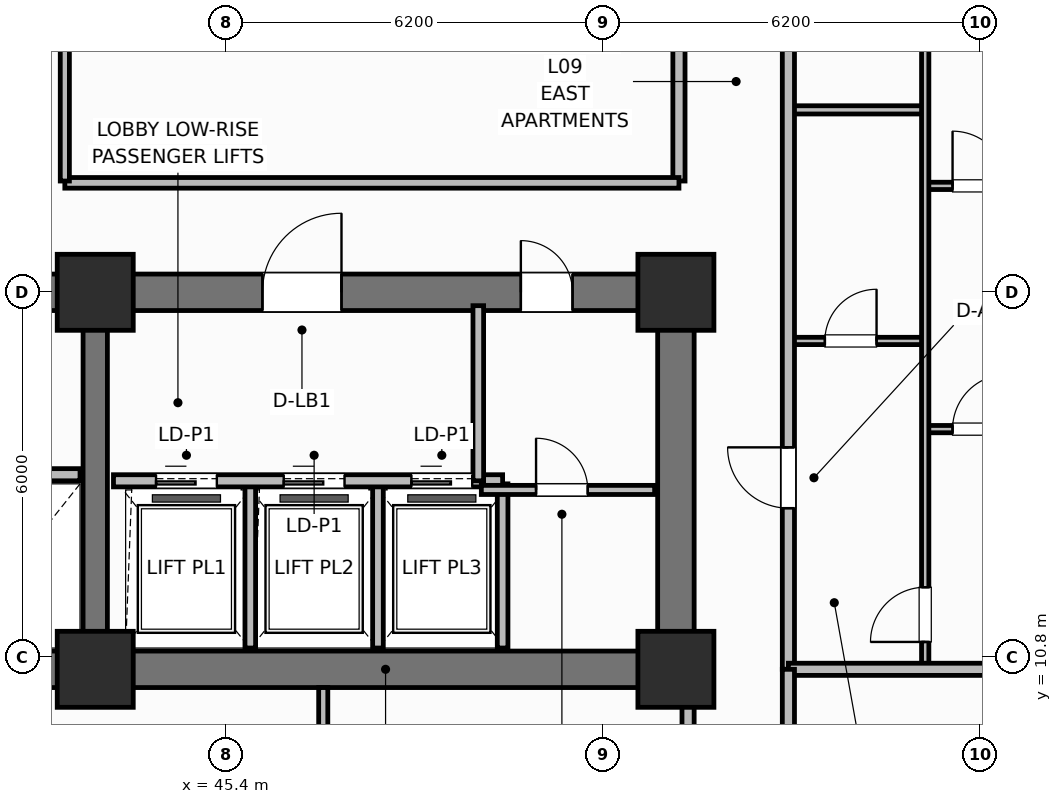
"""IFC4 building model, lengths in metres.
Left out: names, types, materials, properties, quantities, classifications, styles, units other than length and angle.
Written with IfcOpenShell. Run it as: python <this file> out.ifc"""

import sys

from ifc_helpers import new_model, si_unit, direction, frame, frame_2d, origin, origin_2d, place, context, subcontext, project, spatial, rectangle, extrude, element, fill, save


model = new_model("IFC4")
c1 = context("Model", 3, precision=1e-05, world=origin(), true_north=direction((0.0, 1.0)))
c2 = subcontext(c1, "Body", "Model", "MODEL_VIEW")
j1 = project(units=[si_unit("LENGTHUNIT", "METRE"), si_unit("PLANEANGLEUNIT", "RADIAN")], contexts=[c1])
p1 = place(None, origin())
s1 = spatial("IfcSite", under=j1, at=p1, CompositionType="ELEMENT")
p2 = place(p1, origin())
s2 = spatial("IfcBuilding", under=s1, at=p2, CompositionType="ELEMENT")
p3 = place(p2, frame((0.0, 0.0, 39.9)))
s3 = spatial("IfcBuildingStorey", under=s2, at=p3, CompositionType="ELEMENT", Elevation=39.9)
p4 = place(p3, frame((52.8, 10.6, 0.0), z_axis=(0.0, 0.0, 1.0), x_axis=(-1.0, 0.0, 0.0)))
e1 = element("IfcWall", 1, at=p4, inside=s3, PredefinedType="SHEAR", context=c2, shape_type="SweptSolid", body=[
    extrude(rectangle(XDim=27.2, YDim=0.6, at=frame_2d((13.6, 0.0))), origin(), (0.0, 0.0, 1.0), 3.7),
])
p5 = place(p3, frame((52.8, 10.9, 0.0), z_axis=(0.0, 0.0, 1.0), x_axis=(0.0, 1.0, 0.0)))
e2 = element("IfcWall", 2, at=p5, inside=s3, PredefinedType="SHEAR", context=c2, shape_type="SweptSolid", body=[
    extrude(rectangle(XDim=5.6, YDim=0.6, at=frame_2d((2.8, 0.0))), origin(), (0.0, 0.0, 1.0), 3.7),
])
p6 = place(p3, frame((25.6, 16.8, 0.0), z_axis=(0.0, 0.0, 1.0), x_axis=(1.0, 0.0, 0.0)))
e3 = element("IfcWall", 3, at=p6, inside=s3, PredefinedType="SHEAR", context=c2, shape_type="SweptSolid", body=[
    extrude(rectangle(XDim=27.2, YDim=0.6, at=frame_2d((13.6, 0.0))), origin(), (0.0, 0.0, 1.0), 3.7),
])
p7 = place(p6, frame((1.7, 0.0, 0.0)))
e4 = element("IfcOpeningElement", 4, at=p7, cuts=e3, PredefinedType="OPENING", context=c2, shape_type="SweptSolid", body=[
    extrude(rectangle(XDim=1.1, YDim=2.15, at=frame_2d((0.55, 1.075))), frame((0.0, 0.31, 0.0), z_axis=(0.0, -1.0, 0.0), x_axis=(1.0, 0.0, 0.0)), (0.0, 0.0, 1.0), 0.62),
])
p8 = place(p6, frame((4.45, 0.0, 0.0)))
e5 = element("IfcOpeningElement", 5, at=p8, cuts=e3, PredefinedType="OPENING", context=c2, shape_type="SweptSolid", body=[
    extrude(rectangle(XDim=0.85, YDim=2.1, at=frame_2d((0.425, 1.05))), frame((0.0, 0.31, 0.0), z_axis=(0.0, -1.0, 0.0), x_axis=(1.0, 0.0, 0.0)), (0.0, 0.0, 1.0), 0.62),
])
p9 = place(p6, frame((6.5, 0.0, 0.0)))
e6 = element("IfcOpeningElement", 6, at=p9, cuts=e3, PredefinedType="OPENING", context=c2, shape_type="SweptSolid", body=[
    extrude(rectangle(XDim=0.85, YDim=2.1, at=frame_2d((0.425, 1.05))), frame((0.0, 0.31, 0.0), z_axis=(0.0, -1.0, 0.0), x_axis=(1.0, 0.0, 0.0)), (0.0, 0.0, 1.0), 0.62),
])
p10 = place(p6, frame((13.0, 0.0, 0.0)))
e7 = element("IfcOpeningElement", 7, at=p10, cuts=e3, PredefinedType="OPENING", context=c2, shape_type="SweptSolid", body=[
    extrude(rectangle(XDim=1.2, YDim=2.15, at=frame_2d((0.6, 1.075))), frame((0.0, 0.31, 0.0), z_axis=(0.0, -1.0, 0.0), x_axis=(1.0, 0.0, 0.0)), (0.0, 0.0, 1.0), 0.62),
])
p11 = place(p6, frame((20.4, 0.0, 0.0)))
e8 = element("IfcOpeningElement", 8, at=p11, cuts=e3, PredefinedType="OPENING", context=c2, shape_type="SweptSolid", body=[
    extrude(rectangle(XDim=1.3, YDim=2.2, at=frame_2d((0.65, 1.1))), frame((0.0, 0.31, 0.0), z_axis=(0.0, -1.0, 0.0), x_axis=(1.0, 0.0, 0.0)), (0.0, 0.0, 1.0), 0.62),
])
p12 = place(p6, frame((24.65, 0.0, 0.0)))
e9 = element("IfcOpeningElement", 9, at=p12, cuts=e3, PredefinedType="OPENING", context=c2, shape_type="SweptSolid", body=[
    extrude(rectangle(XDim=0.85, YDim=2.1, at=frame_2d((0.425, 1.05))), frame((0.0, 0.31, 0.0), z_axis=(0.0, -1.0, 0.0), x_axis=(1.0, 0.0, 0.0)), (0.0, 0.0, 1.0), 0.62),
])
p13 = place(p3, frame((43.25, 10.9, 0.0), z_axis=(0.0, 0.0, 1.0), x_axis=(0.0, 1.0, 0.0)))
e10 = element("IfcWall", 10, at=p13, inside=s3, PredefinedType="SHEAR", context=c2, shape_type="SweptSolid", body=[
    extrude(rectangle(XDim=5.6, YDim=0.4, at=frame_2d((2.8, 0.0))), origin(), (0.0, 0.0, 1.0), 3.7),
])
for number, where, z_axis, x_axis in (
    (11, (43.25, 10.6, 0.0), (0.0, 0.0, 1.0), (1.0, 0.0, 0.0)),
    (12, (43.25, 16.8, 0.0), (0.0, 0.0, 1.0), (1.0, 0.0, 0.0)),
    (13, (52.8, 10.6, 0.0), (0.0, 0.0, 1.0), (1.0, 0.0, 0.0)),
    (14, (52.8, 16.8, 0.0), (0.0, 0.0, 1.0), (1.0, 0.0, 0.0)),
):
    element("IfcColumn", number, at=place(p3, frame(where, z_axis=z_axis, x_axis=x_axis)), inside=s3, PredefinedType="COLUMN", context=c2, shape_type="SweptSolid", body=[
        extrude(rectangle(XDim=1.25, YDim=1.25, at=origin_2d()), origin(), (0.0, 0.0, 1.0), 3.7),
    ])
p14 = place(p3, frame((35.4, 13.8, 0.0), z_axis=(0.0, 0.0, 1.0), x_axis=(1.0, 0.0, 0.0)))
e15 = element("IfcWall", 15, at=p14, inside=s3, PredefinedType="PARTITIONING", context=c2, shape_type="SweptSolid", body=[
    extrude(rectangle(XDim=7.6, YDim=0.2, at=frame_2d((3.8, 0.0))), origin(), (0.0, 0.0, 1.0), 2.3),
])
p15 = place(p14, frame((0.7, 0.0, 0.0)))
e16 = element("IfcOpeningElement", 16, at=p15, cuts=e15, PredefinedType="OPENING", context=c2, shape_type="SweptSolid", body=[
    extrude(rectangle(XDim=1.1, YDim=2.15, at=frame_2d((0.55, 1.075))), frame((0.0, 0.11, 0.0), z_axis=(0.0, -1.0, 0.0), x_axis=(1.0, 0.0, 0.0)), (0.0, 0.0, 1.0), 0.22),
])
p16 = place(p14, frame((3.35, 0.0, 0.0)))
e17 = element("IfcOpeningElement", 17, at=p16, cuts=e15, PredefinedType="OPENING", context=c2, shape_type="SweptSolid", body=[
    extrude(rectangle(XDim=1.2, YDim=2.15, at=frame_2d((0.6, 1.075))), frame((0.0, 0.11, 0.0), z_axis=(0.0, -1.0, 0.0), x_axis=(1.0, 0.0, 0.0)), (0.0, 0.0, 1.0), 0.22),
])
for number, where, z_axis, x_axis in (
    (18, (45.8, 10.95, 0.0), (0.0, 0.0, 1.0), (0.0, 1.0, 0.0)),
    (19, (47.9, 10.95, 0.0), (0.0, 0.0, 1.0), (0.0, 1.0, 0.0)),
    (20, (49.95, 10.95, 0.0), (0.0, 0.0, 1.0), (0.0, 1.0, 0.0)),
):
    element("IfcWall", number, at=place(p3, frame(where, z_axis=z_axis, x_axis=x_axis)), inside=s3, PredefinedType="PARTITIONING", context=c2, shape_type="SweptSolid", body=[
        extrude(rectangle(XDim=2.7, YDim=0.175, at=frame_2d((1.35, 0.0))), origin(), (0.0, 0.0, 1.0), 2.53),
    ])
p17 = place(p3, frame((43.55, 13.7, 0.0), z_axis=(0.0, 0.0, 1.0), x_axis=(1.0, 0.0, 0.0)))
e21 = element("IfcWall", 21, at=p17, inside=s3, PredefinedType="PARTITIONING", context=c2, shape_type="SweptSolid", body=[
    extrude(rectangle(XDim=6.4, YDim=0.2, at=frame_2d((3.2, 0.0))), origin(), (0.0, 0.0, 1.0), 2.53),
])
p18 = place(p17, frame((0.7, 0.0, 0.0)))
e22 = element("IfcOpeningElement", 22, at=p18, cuts=e21, PredefinedType="OPENING", context=c2, shape_type="SweptSolid", body=[
    extrude(rectangle(XDim=1.0, YDim=2.15, at=frame_2d((0.5, 1.075))), frame((0.0, 0.11, 0.0), z_axis=(0.0, -1.0, 0.0), x_axis=(1.0, 0.0, 0.0)), (0.0, 0.0, 1.0), 0.22),
])
p19 = place(p17, frame((2.8, 0.0, 0.0)))
e23 = element("IfcOpeningElement", 23, at=p19, cuts=e21, PredefinedType="OPENING", context=c2, shape_type="SweptSolid", body=[
    extrude(rectangle(XDim=1.0, YDim=2.15, at=frame_2d((0.5, 1.075))), frame((0.0, 0.11, 0.0), z_axis=(0.0, -1.0, 0.0), x_axis=(1.0, 0.0, 0.0)), (0.0, 0.0, 1.0), 0.22),
])
p20 = place(p17, frame((4.9, 0.0, 0.0)))
e24 = element("IfcOpeningElement", 24, at=p20, cuts=e21, PredefinedType="OPENING", context=c2, shape_type="SweptSolid", body=[
    extrude(rectangle(XDim=1.0, YDim=2.15, at=frame_2d((0.5, 1.075))), frame((0.0, 0.11, 0.0), z_axis=(0.0, -1.0, 0.0), x_axis=(1.0, 0.0, 0.0)), (0.0, 0.0, 1.0), 0.22),
])
p21 = place(p3, frame((49.55, 13.7, 0.0), z_axis=(0.0, 0.0, 1.0), x_axis=(0.0, 1.0, 0.0)))
e25 = element("IfcWall", 25, at=p21, inside=s3, PredefinedType="PARTITIONING", context=c2, shape_type="SweptSolid", body=[
    extrude(rectangle(XDim=2.88, YDim=0.175, at=frame_2d((1.44, 0.0))), origin(), (0.0, 0.0, 1.0), 2.53),
])
p22 = place(p3, frame((49.6, 13.55, 0.0), z_axis=(0.0, 0.0, 1.0), x_axis=(1.0, 0.0, 0.0)))
e26 = element("IfcWall", 26, at=p22, inside=s3, PredefinedType="PARTITIONING", context=c2, shape_type="SweptSolid", body=[
    extrude(rectangle(XDim=2.85, YDim=0.15, at=frame_2d((1.425, 0.0))), origin(), (0.0, 0.0, 1.0), 2.53),
])
p23 = place(p22, frame((0.9, 0.0, 0.0)))
e27 = element("IfcOpeningElement", 27, at=p23, cuts=e26, PredefinedType="OPENING", context=c2, shape_type="SweptSolid", body=[
    extrude(rectangle(XDim=0.85, YDim=2.1, at=frame_2d((0.425, 1.05))), frame((0.0, 0.085, 0.0), z_axis=(0.0, -1.0, 0.0), x_axis=(1.0, 0.0, 0.0)), (0.0, 0.0, 1.0), 0.17),
])
p24 = place(p3, frame((52.85, 18.63, 0.0), z_axis=(0.0, 0.0, 1.0), x_axis=(0.0, 1.0, 0.0)))
e28 = element("IfcWall", 28, at=p24, inside=s3, PredefinedType="PARTITIONING", context=c2, shape_type="SweptSolid", body=[
    extrude(rectangle(XDim=19.14, YDim=0.2, at=frame_2d((9.57, 0.0))), origin(), (0.0, 0.0, 1.0), 2.53),
])
p25 = place(p3, frame((42.75, 18.6, 0.0), z_axis=(0.0, 0.0, 1.0), x_axis=(1.0, 0.0, 0.0)))
e29 = element("IfcWall", 29, at=p25, inside=s3, PredefinedType="PARTITIONING", context=c2, shape_type="SweptSolid", body=[
    extrude(rectangle(XDim=10.1, YDim=0.175, at=frame_2d((5.05, 0.0))), origin(), (0.0, 0.0, 1.0), 2.53),
])
p26 = place(p3, frame((42.75, 18.63, 0.0), z_axis=(0.0, 0.0, 1.0), x_axis=(0.0, 1.0, 0.0)))
e30 = element("IfcWall", 30, at=p26, inside=s3, PredefinedType="PARTITIONING", context=c2, shape_type="SweptSolid", body=[
    extrude(rectangle(XDim=19.14, YDim=0.15, at=frame_2d((9.57, 0.0))), origin(), (0.0, 0.0, 1.0), 2.53),
])
p27 = place(p26, frame((5.5, 0.0, 0.0)))
e31 = element("IfcOpeningElement", 31, at=p27, cuts=e30, PredefinedType="OPENING", context=c2, shape_type="SweptSolid", body=[
    extrude(rectangle(XDim=1.0, YDim=2.15, at=frame_2d((0.5, 1.075))), frame((0.0, 0.085, 0.0), z_axis=(0.0, -1.0, 0.0), x_axis=(1.0, 0.0, 0.0)), (0.0, 0.0, 1.0), 0.17),
])
p28 = place(p3, frame((54.65, 16.0, 0.0), z_axis=(0.0, 0.0, 1.0), x_axis=(1.0, 0.0, 0.0)))
e32 = element("IfcWall", 32, at=p28, inside=s3, PredefinedType="PARTITIONING", context=c2, shape_type="SweptSolid", body=[
    extrude(rectangle(XDim=2.25, YDim=0.12, at=frame_2d((1.125, 0.0))), origin(), (0.0, 0.0, 1.0), 2.53),
])
p29 = place(p28, frame((0.6, 0.0, 0.0)))
e33 = element("IfcOpeningElement", 33, at=p29, cuts=e32, PredefinedType="OPENING", context=c2, shape_type="SweptSolid", body=[
    extrude(rectangle(XDim=0.85, YDim=2.1, at=frame_2d((0.425, 1.05))), frame((0.0, 0.07, 0.0), z_axis=(0.0, -1.0, 0.0), x_axis=(1.0, 0.0, 0.0)), (0.0, 0.0, 1.0), 0.14),
])
p30 = place(p3, frame((54.65, 19.8, 0.0), z_axis=(0.0, 0.0, 1.0), x_axis=(1.0, 0.0, 0.0)))
e34 = element("IfcWall", 34, at=p30, inside=s3, PredefinedType="PARTITIONING", context=c2, shape_type="SweptSolid", body=[
    extrude(rectangle(XDim=2.25, YDim=0.135, at=frame_2d((1.125, 0.0))), origin(), (0.0, 0.0, 1.0), 2.53),
])
p31 = place(p3, frame((56.9, 14.55, 0.0), z_axis=(0.0, 0.0, 1.0), x_axis=(1.0, 0.0, 0.0)))
e35 = element("IfcWall", 35, at=p31, inside=s3, PredefinedType="PARTITIONING", context=c2, shape_type="SweptSolid", body=[
    extrude(rectangle(XDim=6.93, YDim=0.12, at=frame_2d((3.465, 0.0))), origin(), (0.0, 0.0, 1.0), 2.53),
])
p32 = place(p31, frame((0.45, 0.0, 0.0)))
e36 = element("IfcOpeningElement", 36, at=p32, cuts=e35, PredefinedType="OPENING", context=c2, shape_type="SweptSolid", body=[
    extrude(rectangle(XDim=0.9, YDim=2.1, at=frame_2d((0.45, 1.05))), frame((0.0, 0.07, 0.0), z_axis=(0.0, -1.0, 0.0), x_axis=(1.0, 0.0, 0.0)), (0.0, 0.0, 1.0), 0.14),
])
p33 = place(p3, frame((56.9, 18.55, 0.0), z_axis=(0.0, 0.0, 1.0), x_axis=(1.0, 0.0, 0.0)))
e37 = element("IfcWall", 37, at=p33, inside=s3, PredefinedType="PARTITIONING", context=c2, shape_type="SweptSolid", body=[
    extrude(rectangle(XDim=6.93, YDim=0.12, at=frame_2d((3.465, 0.0))), origin(), (0.0, 0.0, 1.0), 2.53),
])
p34 = place(p33, frame((0.45, 0.0, 0.0)))
e38 = element("IfcOpeningElement", 38, at=p34, cuts=e37, PredefinedType="OPENING", context=c2, shape_type="SweptSolid", body=[
    extrude(rectangle(XDim=0.9, YDim=2.1, at=frame_2d((0.45, 1.05))), frame((0.0, 0.07, 0.0), z_axis=(0.0, -1.0, 0.0), x_axis=(1.0, 0.0, 0.0)), (0.0, 0.0, 1.0), 0.14),
])
p35 = place(p3, frame((56.9, 10.64, 0.0), z_axis=(0.0, 0.0, 1.0), x_axis=(0.0, 1.0, 0.0)))
e39 = element("IfcWall", 39, at=p35, inside=s3, PredefinedType="PARTITIONING", context=c2, shape_type="SweptSolid", body=[
    extrude(rectangle(XDim=15.92, YDim=0.12, at=frame_2d((7.96, 0.0))), origin(), (0.0, 0.0, 1.0), 2.53),
])
p36 = place(p35, frame((0.41, 0.0, 0.0)))
e40 = element("IfcOpeningElement", 40, at=p36, cuts=e39, PredefinedType="OPENING", context=c2, shape_type="SweptSolid", body=[
    extrude(rectangle(XDim=0.9, YDim=2.1, at=frame_2d((0.45, 1.05))), frame((0.0, 0.07, 0.0), z_axis=(0.0, -1.0, 0.0), x_axis=(1.0, 0.0, 0.0)), (0.0, 0.0, 1.0), 0.14),
])
p37 = place(p35, frame((13.125, 0.0, 0.0)))
e41 = element("IfcOpeningElement", 41, at=p37, cuts=e39, PredefinedType="OPENING", context=c2, shape_type="SweptSolid", body=[
    extrude(rectangle(XDim=0.82, YDim=2.08, at=frame_2d((0.41, 1.04))), frame((0.0, 0.07, 0.0), z_axis=(0.0, -1.0, 0.0), x_axis=(1.0, 0.0, 0.0)), (0.0, 0.0, 1.0), 0.14),
])
p38 = place(p3, frame((54.65, 10.6, 0.0), z_axis=(0.0, 0.0, 1.0), x_axis=(0.0, 1.0, 0.0)))
e42 = element("IfcWall", 42, at=p38, inside=s3, PredefinedType="PARTITIONING", context=c2, shape_type="SweptSolid", body=[
    extrude(rectangle(XDim=35.2, YDim=0.2, at=frame_2d((17.6, 0.0))), origin(), (0.0, 0.0, 1.0), 2.53),
])
p39 = place(p38, frame((2.65, 0.0, 0.0)))
e43 = element("IfcOpeningElement", 43, at=p39, cuts=e42, PredefinedType="OPENING", context=c2, shape_type="SweptSolid", body=[
    extrude(rectangle(XDim=1.0, YDim=2.15, at=frame_2d((0.5, 1.075))), frame((0.0, 0.11, 0.0), z_axis=(0.0, -1.0, 0.0), x_axis=(1.0, 0.0, 0.0)), (0.0, 0.0, 1.0), 0.22),
])
p40 = place(p38, frame((19.95, 0.0, 0.0)))
e44 = element("IfcOpeningElement", 44, at=p40, cuts=e42, PredefinedType="OPENING", context=c2, shape_type="SweptSolid", body=[
    extrude(rectangle(XDim=1.0, YDim=2.15, at=frame_2d((0.5, 1.075))), frame((0.0, 0.11, 0.0), z_axis=(0.0, -1.0, 0.0), x_axis=(1.0, 0.0, 0.0)), (0.0, 0.0, 1.0), 0.22),
])
p41 = place(p3, frame((54.65, 10.6, 0.0), z_axis=(0.0, 0.0, 1.0), x_axis=(1.0, 0.0, 0.0)))
e45 = element("IfcWall", 45, at=p41, inside=s3, PredefinedType="PARTITIONING", context=c2, shape_type="SweptSolid", body=[
    extrude(rectangle(XDim=8.76, YDim=0.2, at=frame_2d((4.38, 0.0))), origin(), (0.0, 0.0, 1.0), 2.53),
])
p42 = place(p3, frame((54.65, 4.97, 0.0), z_axis=(0.0, 0.0, 1.0), x_axis=(0.0, 1.0, 0.0)))
e46 = element("IfcWall", 46, at=p42, inside=s3, PredefinedType="PARTITIONING", context=c2, shape_type="SweptSolid", body=[
    extrude(rectangle(XDim=5.63, YDim=0.2, at=frame_2d((2.815, 0.0))), origin(), (0.0, 0.0, 1.0), 2.53),
])
p43 = place(p3, frame((47.0, 4.97, 0.0), z_axis=(0.0, 0.0, 1.0), x_axis=(0.0, 1.0, 0.0)))
e47 = element("IfcWall", 47, at=p43, inside=s3, PredefinedType="PARTITIONING", context=c2, shape_type="SweptSolid", body=[
    extrude(rectangle(XDim=5.33, YDim=0.15, at=frame_2d((2.665, 0.0))), origin(), (0.0, 0.0, 1.0), 2.53),
])
p44 = place(p43, frame((1.6, 0.0, 0.0)))
e48 = element("IfcOpeningElement", 48, at=p44, cuts=e47, PredefinedType="OPENING", context=c2, shape_type="SweptSolid", body=[
    extrude(rectangle(XDim=0.9, YDim=2.1, at=frame_2d((0.45, 1.05))), frame((0.0, 0.085, 0.0), z_axis=(0.0, -1.0, 0.0), x_axis=(1.0, 0.0, 0.0)), (0.0, 0.0, 1.0), 0.17),
])
p45 = place(p3, frame((53.0, 5.92, 0.0), z_axis=(0.0, 0.0, 1.0), x_axis=(0.0, 1.0, 0.0)))
e49 = element("IfcWall", 49, at=p45, inside=s3, PredefinedType="PARTITIONING", context=c2, shape_type="SweptSolid", body=[
    extrude(rectangle(XDim=4.38, YDim=0.2, at=frame_2d((2.19, 0.0))), origin(), (0.0, 0.0, 1.0), 2.53),
])
p46 = place(p45, frame((0.85, 0.0, 0.0)))
e50 = element("IfcOpeningElement", 50, at=p46, cuts=e49, PredefinedType="OPENING", context=c2, shape_type="SweptSolid", body=[
    extrude(rectangle(XDim=0.9, YDim=2.1, at=frame_2d((0.45, 1.05))), frame((0.0, 0.11, 0.0), z_axis=(0.0, -1.0, 0.0), x_axis=(1.0, 0.0, 0.0)), (0.0, 0.0, 1.0), 0.22),
])
p47 = place(p18, origin())
e51 = element("IfcDoor", 51, at=p47, inside=s3, OperationType="SLIDING_TO_LEFT", PredefinedType="DOOR", context=c2, shape_type="SweptSolid", body=[
    extrude(rectangle(XDim=1.0, YDim=2.15, at=frame_2d((0.5, 1.075))), frame((0.0, 0.025, 0.0), z_axis=(0.0, -1.0, 0.0), x_axis=(1.0, 0.0, 0.0)), (0.0, 0.0, 1.0), 0.05),
])
fill(e22, e51)
p48 = place(p19, origin())
e52 = element("IfcDoor", 52, at=p48, inside=s3, OperationType="SLIDING_TO_LEFT", PredefinedType="DOOR", context=c2, shape_type="SweptSolid", body=[
    extrude(rectangle(XDim=1.0, YDim=2.15, at=frame_2d((0.5, 1.075))), frame((0.0, 0.025, 0.0), z_axis=(0.0, -1.0, 0.0), x_axis=(1.0, 0.0, 0.0)), (0.0, 0.0, 1.0), 0.05),
])
fill(e23, e52)
p49 = place(p20, origin())
e53 = element("IfcDoor", 53, at=p49, inside=s3, OperationType="SLIDING_TO_LEFT", PredefinedType="DOOR", context=c2, shape_type="SweptSolid", body=[
    extrude(rectangle(XDim=1.0, YDim=2.15, at=frame_2d((0.5, 1.075))), frame((0.0, 0.025, 0.0), z_axis=(0.0, -1.0, 0.0), x_axis=(1.0, 0.0, 0.0)), (0.0, 0.0, 1.0), 0.05),
])
fill(e24, e53)
p50 = place(p23, origin())
e54 = element("IfcDoor", 54, at=p50, inside=s3, OperationType="SINGLE_SWING_LEFT", PredefinedType="DOOR", context=c2, shape_type="SweptSolid", body=[
    extrude(rectangle(XDim=0.85, YDim=2.1, at=frame_2d((0.425, 1.05))), frame((0.0, 0.025, 0.0), z_axis=(0.0, -1.0, 0.0), x_axis=(1.0, 0.0, 0.0)), (0.0, 0.0, 1.0), 0.05),
])
fill(e27, e54)
p51 = place(p29, origin())
e55 = element("IfcDoor", 55, at=p51, inside=s3, OperationType="SINGLE_SWING_RIGHT", PredefinedType="DOOR", context=c2, shape_type="SweptSolid", body=[
    extrude(rectangle(XDim=0.85, YDim=2.1, at=frame_2d((0.425, 1.05))), frame((0.0, 0.025, 0.0), z_axis=(0.0, -1.0, 0.0), x_axis=(1.0, 0.0, 0.0)), (0.0, 0.0, 1.0), 0.05),
])
fill(e33, e55)
p52 = place(p32, origin())
e56 = element("IfcDoor", 56, at=p52, inside=s3, OperationType="SINGLE_SWING_RIGHT", PredefinedType="DOOR", context=c2, shape_type="SweptSolid", body=[
    extrude(rectangle(XDim=0.9, YDim=2.1, at=frame_2d((0.45, 1.05))), frame((0.0, 0.025, 0.0), z_axis=(0.0, -1.0, 0.0), x_axis=(1.0, 0.0, 0.0)), (0.0, 0.0, 1.0), 0.05),
])
fill(e36, e56)
p53 = place(p34, origin())
e57 = element("IfcDoor", 57, at=p53, inside=s3, OperationType="SINGLE_SWING_LEFT", PredefinedType="DOOR", context=c2, shape_type="SweptSolid", body=[
    extrude(rectangle(XDim=0.9, YDim=2.1, at=frame_2d((0.45, 1.05))), frame((0.0, 0.025, 0.0), z_axis=(0.0, -1.0, 0.0), x_axis=(1.0, 0.0, 0.0)), (0.0, 0.0, 1.0), 0.05),
])
fill(e38, e57)
p54 = place(p36, origin())
e58 = element("IfcDoor", 58, at=p54, inside=s3, OperationType="SINGLE_SWING_LEFT", PredefinedType="DOOR", context=c2, shape_type="SweptSolid", body=[
    extrude(rectangle(XDim=0.9, YDim=2.1, at=frame_2d((0.45, 1.05))), frame((0.0, 0.025, 0.0), z_axis=(0.0, -1.0, 0.0), x_axis=(1.0, 0.0, 0.0)), (0.0, 0.0, 1.0), 0.05),
])
fill(e40, e58)
p55 = place(p39, origin())
e59 = element("IfcDoor", 59, at=p55, inside=s3, OperationType="SINGLE_SWING_RIGHT", PredefinedType="DOOR", context=c2, shape_type="SweptSolid", body=[
    extrude(rectangle(XDim=1.0, YDim=2.15, at=frame_2d((0.5, 1.075))), frame((0.0, 0.025, 0.0), z_axis=(0.0, -1.0, 0.0), x_axis=(1.0, 0.0, 0.0)), (0.0, 0.0, 1.0), 0.05),
])
fill(e43, e59)
p56 = place(p11, origin())
e60 = element("IfcDoor", 60, at=p56, inside=s3, OperationType="SINGLE_SWING_RIGHT", PredefinedType="DOOR", context=c2, shape_type="SweptSolid", body=[
    extrude(rectangle(XDim=1.3, YDim=2.2, at=frame_2d((0.65, 1.1))), frame((0.0, 0.025, 0.0), z_axis=(0.0, -1.0, 0.0), x_axis=(1.0, 0.0, 0.0)), (0.0, 0.0, 1.0), 0.05),
])
fill(e8, e60)
p57 = place(p12, origin())
e61 = element("IfcDoor", 61, at=p57, inside=s3, OperationType="SINGLE_SWING_LEFT", PredefinedType="DOOR", context=c2, shape_type="SweptSolid", body=[
    extrude(rectangle(XDim=0.85, YDim=2.1, at=frame_2d((0.425, 1.05))), frame((0.0, 0.025, 0.0), z_axis=(0.0, -1.0, 0.0), x_axis=(1.0, 0.0, 0.0)), (0.0, 0.0, 1.0), 0.05),
])
fill(e9, e61)
save(model, sys.argv[1])
